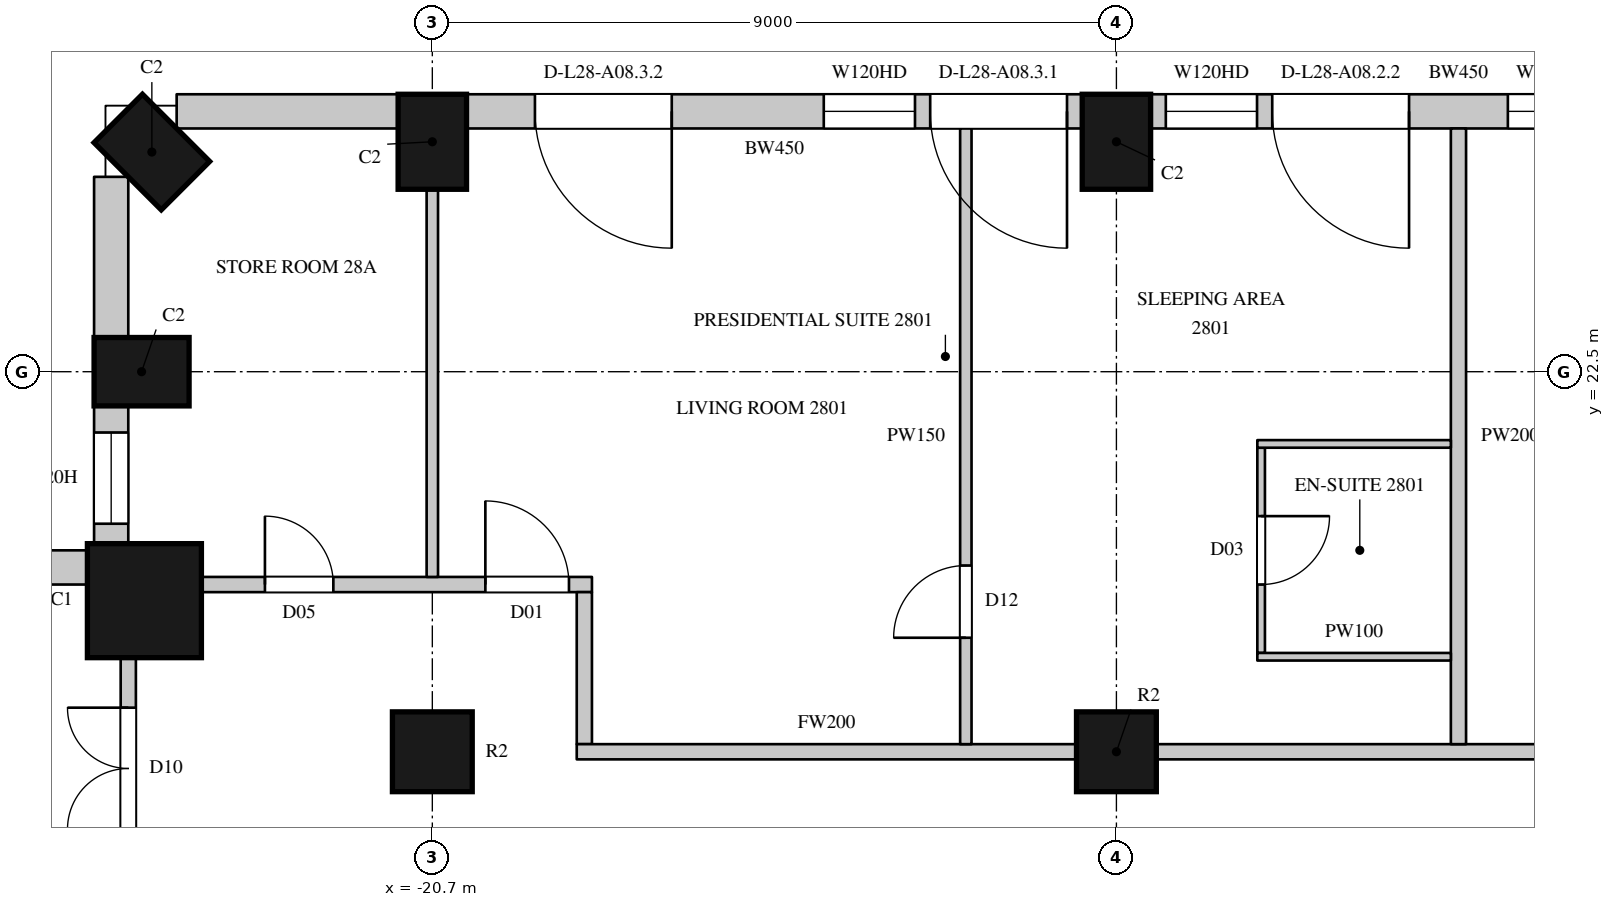
"""IFC4 building model, lengths in metres.
Left out: names, types, materials, properties, quantities, classifications, styles, units other than length and angle.
Written with IfcOpenShell. Run it as: python <this file> out.ifc"""

import sys

from ifc_helpers import new_model, si_unit, direction, frame, frame_2d, origin, origin_2d, place, context, subcontext, project, spatial, rectangle, circle, extrude, element, fill, save


model = new_model("IFC4")
c1 = context("Model", 3, precision=1e-05, world=origin(), true_north=direction((0.0, 1.0)))
c2 = subcontext(c1, "Body", "Model", "MODEL_VIEW")
j1 = project(units=[si_unit("LENGTHUNIT", "METRE"), si_unit("PLANEANGLEUNIT", "RADIAN")], contexts=[c1])
p1 = place(None, origin())
s1 = spatial("IfcSite", under=j1, at=p1, CompositionType="ELEMENT")
p2 = place(p1, origin())
s2 = spatial("IfcBuilding", under=s1, at=p2, CompositionType="ELEMENT")
p3 = place(p2, frame((0.0, 0.0, 131.1)))
s3 = spatial("IfcBuildingStorey", under=s2, at=p3, CompositionType="ELEMENT", Elevation=131.1)
for number, where, z_axis, x_axis in (
    (1, (-11.7, 25.525, 0.0), (0.0, 0.0, 1.0), (-1.0, 0.0, 0.0)),
    (2, (-20.7, 25.525, 0.0), (0.0, 0.0, 1.0), (-1.0, 0.0, 0.0)),
    (3, (-24.39, 25.39, 0.0), (0.0, 0.0, 1.0), (-0.707, -0.707, 0.0)),
    (4, (-24.525, 22.5, 0.0), (0.0, 0.0, 1.0), (0.0, -1.0, 0.0)),
):
    element("IfcColumn", number, at=place(p3, frame(where, z_axis=z_axis, x_axis=x_axis)), inside=s3, PredefinedType="COLUMN", context=c2, shape_type="SweptSolid", body=[
        extrude(rectangle(XDim=0.9, YDim=1.25, at=origin_2d()), origin(), (0.0, 0.0, 1.0), 3.6),
    ])
p4 = place(p3, frame((-24.488, 19.488, 0.0), z_axis=(0.0, 0.0, 1.0), x_axis=(1.0, 0.0, 0.0)))
e5 = element("IfcColumn", 5, at=p4, inside=s3, PredefinedType="COLUMN", context=c2, shape_type="SweptSolid", body=[
    extrude(circle(Radius=0.75, at=origin_2d()), origin(), (0.0, 0.0, 1.0), 3.6),
])
for number, where, z_axis, x_axis in (
    (6, (-20.7, 17.5, 0.0), (0.0, 0.0, 1.0), (1.0, 0.0, 0.0)),
    (7, (-11.7, 17.5, 0.0), (0.0, 0.0, 1.0), (1.0, 0.0, 0.0)),
):
    element("IfcColumn", number, at=place(p3, frame(where, z_axis=z_axis, x_axis=x_axis)), inside=s3, PredefinedType="COLUMN", context=c2, shape_type="SweptSolid", body=[
        extrude(circle(Radius=0.525, at=origin_2d()), origin(), (0.0, 0.0, 1.0), 3.6),
    ])
p5 = place(p3, frame((-3.15, 25.925, 0.0), z_axis=(0.0, 0.0, 1.0), x_axis=(-1.0, 0.0, 0.0)))
e8 = element("IfcWall", 8, at=p5, inside=s3, PredefinedType="SOLIDWALL", context=c2, shape_type="SweptSolid", body=[
    extrude(rectangle(XDim=8.1, YDim=0.45, at=frame_2d((4.05, 0.0))), origin(), (0.0, 0.0, 1.0), 3.3),
])
p6 = place(p5, frame((0.2, 0.0, 0.0)))
e9 = element("IfcOpeningElement", 9, at=p6, cuts=e8, PredefinedType="OPENING", context=c2, shape_type="SweptSolid", body=[
    extrude(rectangle(XDim=1.8, YDim=2.4, at=frame_2d((0.9, 1.2))), frame((0.0, 0.235, 0.0), z_axis=(0.0, -1.0, 0.0), x_axis=(1.0, 0.0, 0.0)), (0.0, 0.0, 1.0), 0.47),
])
p7 = place(p5, frame((2.2, 0.0, 1.05)))
e10 = element("IfcOpeningElement", 10, at=p7, cuts=e8, PredefinedType="OPENING", context=c2, shape_type="SweptSolid", body=[
    extrude(rectangle(XDim=1.2, YDim=2.0, at=frame_2d((0.6, 1.0))), frame((0.0, 0.235, 0.0), z_axis=(0.0, -1.0, 0.0), x_axis=(1.0, 0.0, 0.0)), (0.0, 0.0, 1.0), 0.47),
])
p8 = place(p5, frame((4.7, 0.0, 0.0)))
e11 = element("IfcOpeningElement", 11, at=p8, cuts=e8, PredefinedType="OPENING", context=c2, shape_type="SweptSolid", body=[
    extrude(rectangle(XDim=1.8, YDim=2.4, at=frame_2d((0.9, 1.2))), frame((0.0, 0.235, 0.0), z_axis=(0.0, -1.0, 0.0), x_axis=(1.0, 0.0, 0.0)), (0.0, 0.0, 1.0), 0.47),
])
p9 = place(p5, frame((6.7, 0.0, 1.05)))
e12 = element("IfcOpeningElement", 12, at=p9, cuts=e8, PredefinedType="OPENING", context=c2, shape_type="SweptSolid", body=[
    extrude(rectangle(XDim=1.2, YDim=2.0, at=frame_2d((0.6, 1.0))), frame((0.0, 0.235, 0.0), z_axis=(0.0, -1.0, 0.0), x_axis=(1.0, 0.0, 0.0)), (0.0, 0.0, 1.0), 0.47),
])
p10 = place(p3, frame((-12.15, 25.925, 0.0), z_axis=(0.0, 0.0, 1.0), x_axis=(-1.0, 0.0, 0.0)))
e13 = element("IfcWall", 13, at=p10, inside=s3, PredefinedType="SOLIDWALL", context=c2, shape_type="SweptSolid", body=[
    extrude(rectangle(XDim=8.1, YDim=0.45, at=frame_2d((4.05, 0.0))), origin(), (0.0, 0.0, 1.0), 3.3),
])
p11 = place(p10, frame((0.2, 0.0, 0.0)))
e14 = element("IfcOpeningElement", 14, at=p11, cuts=e13, PredefinedType="OPENING", context=c2, shape_type="SweptSolid", body=[
    extrude(rectangle(XDim=1.8, YDim=2.4, at=frame_2d((0.9, 1.2))), frame((0.0, 0.235, 0.0), z_axis=(0.0, -1.0, 0.0), x_axis=(1.0, 0.0, 0.0)), (0.0, 0.0, 1.0), 0.47),
])
p12 = place(p10, frame((2.2, 0.0, 1.05)))
e15 = element("IfcOpeningElement", 15, at=p12, cuts=e13, PredefinedType="OPENING", context=c2, shape_type="SweptSolid", body=[
    extrude(rectangle(XDim=1.2, YDim=2.0, at=frame_2d((0.6, 1.0))), frame((0.0, 0.235, 0.0), z_axis=(0.0, -1.0, 0.0), x_axis=(1.0, 0.0, 0.0)), (0.0, 0.0, 1.0), 0.47),
])
p13 = place(p10, frame((5.4, 0.0, 0.0)))
e16 = element("IfcOpeningElement", 16, at=p13, cuts=e13, PredefinedType="OPENING", context=c2, shape_type="SweptSolid", body=[
    extrude(rectangle(XDim=1.8, YDim=2.4, at=frame_2d((0.9, 1.2))), frame((0.0, 0.235, 0.0), z_axis=(0.0, -1.0, 0.0), x_axis=(1.0, 0.0, 0.0)), (0.0, 0.0, 1.0), 0.47),
])
p14 = place(p3, frame((-21.15, 25.925, 0.0), z_axis=(0.0, 0.0, 1.0), x_axis=(-1.0, 0.0, 0.0)))
e17 = element("IfcWall", 17, at=p14, inside=s3, PredefinedType="SOLIDWALL", context=c2, shape_type="SweptSolid", body=[
    extrude(rectangle(XDim=2.914, YDim=0.45, at=frame_2d((1.457, 0.0))), origin(), (0.0, 0.0, 1.0), 3.3),
])
p15 = place(p3, frame((-24.925, 25.064, 0.0), z_axis=(0.0, 0.0, 1.0), x_axis=(0.0, -1.0, 0.0)))
e18 = element("IfcWall", 18, at=p15, inside=s3, PredefinedType="SOLIDWALL", context=c2, shape_type="SweptSolid", body=[
    extrude(rectangle(XDim=2.114, YDim=0.45, at=frame_2d((1.057, 0.0))), origin(), (0.0, 0.0, 1.0), 3.3),
])
p16 = place(p3, frame((-24.925, 22.05, 0.0), z_axis=(0.0, 0.0, 1.0), x_axis=(0.0, -1.0, 0.0)))
e19 = element("IfcWall", 19, at=p16, inside=s3, PredefinedType="SOLIDWALL", context=c2, shape_type="SweptSolid", body=[
    extrude(rectangle(XDim=1.843, YDim=0.45, at=frame_2d((0.921, 0.0))), origin(), (0.0, 0.0, 1.0), 3.3),
])
p17 = place(p16, frame((0.35, 0.0, 1.05)))
e20 = element("IfcOpeningElement", 20, at=p17, cuts=e19, PredefinedType="OPENING", context=c2, shape_type="SweptSolid", body=[
    extrude(rectangle(XDim=1.2, YDim=2.0, at=frame_2d((0.6, 1.0))), frame((0.0, 0.235, 0.0), z_axis=(0.0, -1.0, 0.0), x_axis=(1.0, 0.0, 0.0)), (0.0, 0.0, 1.0), 0.47),
])
p18 = place(p3, frame((-25.207, 19.925, 0.0), z_axis=(0.0, 0.0, 1.0), x_axis=(-1.0, 0.0, 0.0)))
e21 = element("IfcWall", 21, at=p18, inside=s3, PredefinedType="SOLIDWALL", context=c2, shape_type="SweptSolid", body=[
    extrude(rectangle(XDim=3.857, YDim=0.45, at=frame_2d((1.928, 0.0))), origin(), (0.0, 0.0, 1.0), 3.3),
])
p19 = place(p18, frame((0.643, 0.0, 1.05)))
e22 = element("IfcOpeningElement", 22, at=p19, cuts=e21, PredefinedType="OPENING", context=c2, shape_type="SweptSolid", body=[
    extrude(rectangle(XDim=2.7, YDim=2.0, at=frame_2d((1.35, 1.0))), frame((0.0, 0.235, 0.0), z_axis=(0.0, -1.0, 0.0), x_axis=(1.0, 0.0, 0.0)), (0.0, 0.0, 1.0), 0.47),
])
p20 = place(p3, frame((-24.7, 16.03, 0.0), z_axis=(0.0, 0.0, 1.0), x_axis=(0.0, 1.0, 0.0)))
e23 = element("IfcWall", 23, at=p20, inside=s3, PredefinedType="PARTITIONING", context=c2, shape_type="SweptSolid", body=[
    extrude(rectangle(XDim=2.722, YDim=0.2, at=frame_2d((1.361, 0.0))), origin(), (0.0, 0.0, 1.0), 3.3),
])
p21 = place(p20, frame((0.45, 0.0, 0.0)))
e24 = element("IfcOpeningElement", 24, at=p21, cuts=e23, PredefinedType="OPENING", context=c2, shape_type="SweptSolid", body=[
    extrude(rectangle(XDim=1.6, YDim=2.4, at=frame_2d((0.8, 1.2))), frame((0.0, 0.11, 0.0), z_axis=(0.0, -1.0, 0.0), x_axis=(1.0, 0.0, 0.0)), (0.0, 0.0, 1.0), 0.22),
])
p22 = place(p3, frame((-23.752, 19.7, 0.0), z_axis=(0.0, 0.0, 1.0), x_axis=(1.0, 0.0, 0.0)))
e25 = element("IfcWall", 25, at=p22, inside=s3, PredefinedType="PARTITIONING", context=c2, shape_type="SweptSolid", body=[
    extrude(rectangle(XDim=5.152, YDim=0.2, at=frame_2d((2.576, 0.0))), origin(), (0.0, 0.0, 1.0), 3.3),
])
p23 = place(p22, frame((0.85, 0.0, 0.0)))
e26 = element("IfcOpeningElement", 26, at=p23, cuts=e25, PredefinedType="OPENING", context=c2, shape_type="SweptSolid", body=[
    extrude(rectangle(XDim=0.9, YDim=2.2, at=frame_2d((0.45, 1.1))), frame((0.0, 0.11, 0.0), z_axis=(0.0, -1.0, 0.0), x_axis=(1.0, 0.0, 0.0)), (0.0, 0.0, 1.0), 0.22),
])
p24 = place(p22, frame((3.75, 0.0, 0.0)))
e27 = element("IfcOpeningElement", 27, at=p24, cuts=e25, PredefinedType="OPENING", context=c2, shape_type="SweptSolid", body=[
    extrude(rectangle(XDim=1.1, YDim=2.4, at=frame_2d((0.55, 1.2))), frame((0.0, 0.11, 0.0), z_axis=(0.0, -1.0, 0.0), x_axis=(1.0, 0.0, 0.0)), (0.0, 0.0, 1.0), 0.22),
])
p25 = place(p3, frame((-18.7, 17.6, 0.0), z_axis=(0.0, 0.0, 1.0), x_axis=(0.0, 1.0, 0.0)))
e28 = element("IfcWall", 28, at=p25, inside=s3, PredefinedType="PARTITIONING", context=c2, shape_type="SweptSolid", body=[
    extrude(rectangle(XDim=2.0, YDim=0.2, at=frame_2d((1.0, 0.0))), origin(), (0.0, 0.0, 1.0), 3.3),
])
p26 = place(p3, frame((-18.8, 17.5, 0.0), z_axis=(0.0, 0.0, 1.0), x_axis=(1.0, 0.0, 0.0)))
e29 = element("IfcWall", 29, at=p26, inside=s3, PredefinedType="PARTITIONING", context=c2, shape_type="SweptSolid", body=[
    extrude(rectangle(XDim=6.575, YDim=0.2, at=frame_2d((3.288, 0.0))), origin(), (0.0, 0.0, 1.0), 2.75),
])
p27 = place(p3, frame((-11.175, 17.5, 0.0), z_axis=(0.0, 0.0, 1.0), x_axis=(1.0, 0.0, 0.0)))
e30 = element("IfcWall", 30, at=p27, inside=s3, PredefinedType="PARTITIONING", context=c2, shape_type="SweptSolid", body=[
    extrude(rectangle(XDim=7.95, YDim=0.2, at=frame_2d((3.975, 0.0))), origin(), (0.0, 0.0, 1.0), 2.75),
])
p28 = place(p27, frame((5.2, 0.0, 0.0)))
e31 = element("IfcOpeningElement", 31, at=p28, cuts=e30, PredefinedType="OPENING", context=c2, shape_type="SweptSolid", body=[
    extrude(rectangle(XDim=1.1, YDim=2.4, at=frame_2d((0.55, 1.2))), frame((0.0, 0.11, 0.0), z_axis=(0.0, -1.0, 0.0), x_axis=(1.0, 0.0, 0.0)), (0.0, 0.0, 1.0), 0.22),
])
p29 = place(p3, frame((-20.7, 19.8, 0.0), z_axis=(0.0, 0.0, 1.0), x_axis=(0.0, 1.0, 0.0)))
e32 = element("IfcWall", 32, at=p29, inside=s3, PredefinedType="PARTITIONING", context=c2, shape_type="SweptSolid", body=[
    extrude(rectangle(XDim=5.1, YDim=0.15, at=frame_2d((2.55, 0.0))), origin(), (0.0, 0.0, 1.0), 2.75),
])
p30 = place(p3, frame((-13.681, 17.6, 0.0), z_axis=(0.0, 0.0, 1.0), x_axis=(0.0, 1.0, 0.0)))
e33 = element("IfcWall", 33, at=p30, inside=s3, PredefinedType="PARTITIONING", context=c2, shape_type="SweptSolid", body=[
    extrude(rectangle(XDim=8.1, YDim=0.15, at=frame_2d((4.05, 0.0))), origin(), (0.0, 0.0, 1.0), 3.3),
])
p31 = place(p30, frame((1.4, 0.0, 0.0)))
e34 = element("IfcOpeningElement", 34, at=p31, cuts=e33, PredefinedType="OPENING", context=c2, shape_type="SweptSolid", body=[
    extrude(rectangle(XDim=0.95, YDim=2.2, at=frame_2d((0.475, 1.1))), frame((0.0, 0.085, 0.0), z_axis=(0.0, -1.0, 0.0), x_axis=(1.0, 0.0, 0.0)), (0.0, 0.0, 1.0), 0.17),
])
p32 = place(p3, frame((-7.2, 17.6, 0.0), z_axis=(0.0, 0.0, 1.0), x_axis=(0.0, 1.0, 0.0)))
e35 = element("IfcWall", 35, at=p32, inside=s3, PredefinedType="PARTITIONING", context=c2, shape_type="SweptSolid", body=[
    extrude(rectangle(XDim=8.1, YDim=0.2, at=frame_2d((4.05, 0.0))), origin(), (0.0, 0.0, 1.0), 2.65),
])
p33 = place(p3, frame((-9.796, 18.8, 0.0), z_axis=(0.0, 0.0, 1.0), x_axis=(0.0, 1.0, 0.0)))
e36 = element("IfcWall", 36, at=p33, inside=s3, PredefinedType="PARTITIONING", context=c2, shape_type="SweptSolid", body=[
    extrude(rectangle(XDim=2.7, YDim=0.1, at=frame_2d((1.35, 0.0))), origin(), (0.0, 0.0, 1.0), 3.3),
])
p34 = place(p33, frame((0.9, 0.0, 0.0)))
e37 = element("IfcOpeningElement", 37, at=p34, cuts=e36, PredefinedType="OPENING", context=c2, shape_type="SweptSolid", body=[
    extrude(rectangle(XDim=0.9, YDim=2.2, at=frame_2d((0.45, 1.1))), frame((0.0, 0.06, 0.0), z_axis=(0.0, -1.0, 0.0), x_axis=(1.0, 0.0, 0.0)), (0.0, 0.0, 1.0), 0.12),
])
for number, where, z_axis, x_axis in (
    (38, (-9.846, 18.75, 0.0), (0.0, 0.0, 1.0), (1.0, 0.0, 0.0)),
    (39, (-9.846, 21.55, 0.0), (0.0, 0.0, 1.0), (1.0, 0.0, 0.0)),
):
    element("IfcWall", number, at=place(p3, frame(where, z_axis=z_axis, x_axis=x_axis)), inside=s3, PredefinedType="PARTITIONING", context=c2, shape_type="SweptSolid", body=[
        extrude(rectangle(XDim=2.546, YDim=0.1, at=frame_2d((1.273, 0.0))), origin(), (0.0, 0.0, 1.0), 3.3),
    ])
p35 = place(p7, origin())
e40 = element("IfcWindow", 40, at=p35, inside=s3, PartitioningType="SINGLE_PANEL", PredefinedType="WINDOW", context=c2, shape_type="SweptSolid", body=[
    extrude(rectangle(XDim=1.2, YDim=2.0, at=frame_2d((0.6, 1.0))), frame((0.0, 0.135, 0.0), z_axis=(0.0, -1.0, 0.0), x_axis=(1.0, 0.0, 0.0)), (0.0, 0.0, 1.0), 0.06),
])
fill(e10, e40)
p36 = place(p8, origin())
e41 = element("IfcDoor", 41, at=p36, inside=s3, OperationType="SLIDING_TO_LEFT", PredefinedType="DOOR", context=c2, shape_type="SweptSolid", body=[
    extrude(rectangle(XDim=1.8, YDim=2.4, at=frame_2d((0.9, 1.2))), frame((0.0, 0.13, 0.0), z_axis=(0.0, -1.0, 0.0), x_axis=(1.0, 0.0, 0.0)), (0.0, 0.0, 1.0), 0.05),
])
fill(e11, e41)
p37 = place(p9, origin())
e42 = element("IfcWindow", 42, at=p37, inside=s3, PartitioningType="SINGLE_PANEL", PredefinedType="WINDOW", context=c2, shape_type="SweptSolid", body=[
    extrude(rectangle(XDim=1.2, YDim=2.0, at=frame_2d((0.6, 1.0))), frame((0.0, 0.135, 0.0), z_axis=(0.0, -1.0, 0.0), x_axis=(1.0, 0.0, 0.0)), (0.0, 0.0, 1.0), 0.06),
])
fill(e12, e42)
p38 = place(p11, origin())
e43 = element("IfcDoor", 43, at=p38, inside=s3, OperationType="SLIDING_TO_LEFT", PredefinedType="DOOR", context=c2, shape_type="SweptSolid", body=[
    extrude(rectangle(XDim=1.8, YDim=2.4, at=frame_2d((0.9, 1.2))), frame((0.0, 0.13, 0.0), z_axis=(0.0, -1.0, 0.0), x_axis=(1.0, 0.0, 0.0)), (0.0, 0.0, 1.0), 0.05),
])
fill(e14, e43)
p39 = place(p12, origin())
e44 = element("IfcWindow", 44, at=p39, inside=s3, PartitioningType="SINGLE_PANEL", PredefinedType="WINDOW", context=c2, shape_type="SweptSolid", body=[
    extrude(rectangle(XDim=1.2, YDim=2.0, at=frame_2d((0.6, 1.0))), frame((0.0, 0.135, 0.0), z_axis=(0.0, -1.0, 0.0), x_axis=(1.0, 0.0, 0.0)), (0.0, 0.0, 1.0), 0.06),
])
fill(e15, e44)
p40 = place(p13, origin())
e45 = element("IfcDoor", 45, at=p40, inside=s3, OperationType="SLIDING_TO_LEFT", PredefinedType="DOOR", context=c2, shape_type="SweptSolid", body=[
    extrude(rectangle(XDim=1.8, YDim=2.4, at=frame_2d((0.9, 1.2))), frame((0.0, 0.13, 0.0), z_axis=(0.0, -1.0, 0.0), x_axis=(1.0, 0.0, 0.0)), (0.0, 0.0, 1.0), 0.05),
])
fill(e16, e45)
p41 = place(p17, origin())
e46 = element("IfcWindow", 46, at=p41, inside=s3, PartitioningType="SINGLE_PANEL", PredefinedType="WINDOW", context=c2, shape_type="SweptSolid", body=[
    extrude(rectangle(XDim=1.2, YDim=2.0, at=frame_2d((0.6, 1.0))), frame((0.0, 0.135, 0.0), z_axis=(0.0, -1.0, 0.0), x_axis=(1.0, 0.0, 0.0)), (0.0, 0.0, 1.0), 0.06),
])
fill(e20, e46)
p42 = place(p23, origin())
e47 = element("IfcDoor", 47, at=p42, inside=s3, OperationType="SINGLE_SWING_LEFT", PredefinedType="DOOR", context=c2, shape_type="SweptSolid", body=[
    extrude(rectangle(XDim=0.9, YDim=2.2, at=frame_2d((0.45, 1.1))), frame((0.0, 0.025, 0.0), z_axis=(0.0, -1.0, 0.0), x_axis=(1.0, 0.0, 0.0)), (0.0, 0.0, 1.0), 0.05),
])
fill(e26, e47)
p43 = place(p21, origin())
e48 = element("IfcDoor", 48, at=p43, inside=s3, OperationType="DOUBLE_DOOR_SINGLE_SWING", PredefinedType="DOOR", context=c2, shape_type="SweptSolid", body=[
    extrude(rectangle(XDim=1.6, YDim=2.4, at=frame_2d((0.8, 1.2))), frame((0.0, 0.025, 0.0), z_axis=(0.0, -1.0, 0.0), x_axis=(1.0, 0.0, 0.0)), (0.0, 0.0, 1.0), 0.05),
])
fill(e24, e48)
p44 = place(p24, origin())
e49 = element("IfcDoor", 49, at=p44, inside=s3, OperationType="SINGLE_SWING_LEFT", PredefinedType="DOOR", context=c2, shape_type="SweptSolid", body=[
    extrude(rectangle(XDim=1.1, YDim=2.4, at=frame_2d((0.55, 1.2))), frame((0.0, 0.025, 0.0), z_axis=(0.0, -1.0, 0.0), x_axis=(1.0, 0.0, 0.0)), (0.0, 0.0, 1.0), 0.05),
])
fill(e27, e49)
p45 = place(p31, origin())
e50 = element("IfcDoor", 50, at=p45, inside=s3, OperationType="SINGLE_SWING_LEFT", PredefinedType="DOOR", context=c2, shape_type="SweptSolid", body=[
    extrude(rectangle(XDim=0.95, YDim=2.2, at=frame_2d((0.475, 1.1))), frame((0.0, 0.025, 0.0), z_axis=(0.0, -1.0, 0.0), x_axis=(1.0, 0.0, 0.0)), (0.0, 0.0, 1.0), 0.05),
])
fill(e34, e50)
p46 = place(p34, origin())
e51 = element("IfcDoor", 51, at=p46, inside=s3, OperationType="SINGLE_SWING_LEFT", PredefinedType="DOOR", context=c2, shape_type="SweptSolid", body=[
    extrude(rectangle(XDim=0.9, YDim=2.2, at=frame_2d((0.45, 1.1))), frame((0.0, 0.025, 0.0), z_axis=(0.0, -1.0, 0.0), x_axis=(1.0, 0.0, 0.0)), (0.0, 0.0, 1.0), 0.05),
])
fill(e37, e51)
save(model, sys.argv[1])
